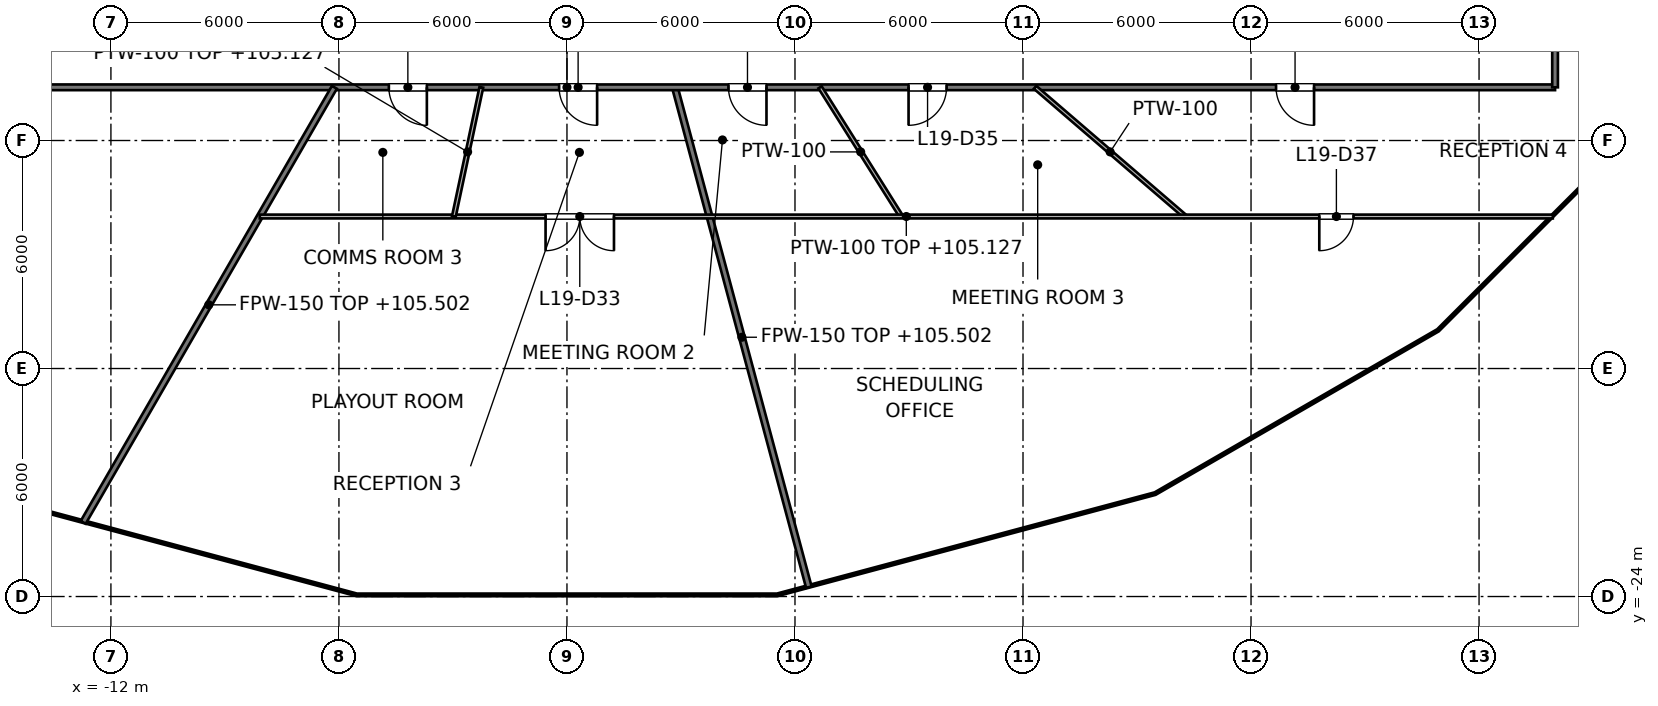
"""IFC4 building model, lengths in metres.
Left out: names, types, materials, properties, quantities, classifications, styles, units other than length and angle.
Written with IfcOpenShell. Run it as: python <this file> out.ifc"""

import sys

from ifc_helpers import new_model, si_unit, direction, frame, frame_2d, origin, place, context, subcontext, project, spatial, rectangle, extrude, element, fill, save


model = new_model("IFC4")
c1 = context("Model", 3, precision=1e-05, world=origin(), true_north=direction((0.0, 1.0)))
c2 = subcontext(c1, "Body", "Model", "MODEL_VIEW")
j1 = project(units=[si_unit("LENGTHUNIT", "METRE"), si_unit("PLANEANGLEUNIT", "RADIAN")], contexts=[c1])
p1 = place(None, origin())
s1 = spatial("IfcSite", under=j1, at=p1, CompositionType="ELEMENT")
p2 = place(p1, origin())
s2 = spatial("IfcBuilding", under=s1, at=p2, CompositionType="ELEMENT")
p3 = place(p2, frame((0.0, 0.0, 102.0)))
s3 = spatial("IfcBuildingStorey", under=s2, at=p3, CompositionType="ELEMENT", Elevation=102.0)
p4 = place(p3, frame((2.84, -10.6, 0.0), z_axis=(0.0, 0.0, 1.0), x_axis=(0.258826294763, -0.965923883719, 0.0)))
e1 = element("IfcWall", 1, at=p4, inside=s3, PredefinedType="PARTITIONING", context=c2, shape_type="SweptSolid", body=[
    extrude(rectangle(XDim=13.618, YDim=0.15, at=frame_2d((6.809, 0.0))), origin(), (0.0, 0.0, 1.0), 3.502),
])
p5 = place(p3, frame((-26.0, -10.6, 0.0), z_axis=(0.0, 0.0, 1.0), x_axis=(1.0, 0.0, 0.0)))
e2 = element("IfcWall", 2, at=p5, inside=s3, PredefinedType="PARTITIONING", context=c2, shape_type="SweptSolid", body=[
    extrude(rectangle(XDim=52.0, YDim=0.15, at=frame_2d((26.0, 0.0))), origin(), (0.0, 0.0, 1.0), 3.127),
])
p6 = place(p5, frame((9.34, 0.0, 0.0)))
e3 = element("IfcOpeningElement", 3, at=p6, cuts=e2, PredefinedType="OPENING", context=c2, shape_type="SweptSolid", body=[
    extrude(rectangle(XDim=1.2, YDim=2.1, at=frame_2d((0.6, 1.05))), frame((0.0, 0.075, 0.0), z_axis=(0.0, -1.0, 0.0), x_axis=(1.0, 0.0, 0.0)), (0.0, 0.0, 1.0), 0.15),
])
p7 = place(p5, frame((21.313, 0.0, 0.0)))
e4 = element("IfcOpeningElement", 4, at=p7, cuts=e2, PredefinedType="OPENING", context=c2, shape_type="SweptSolid", body=[
    extrude(rectangle(XDim=1.0, YDim=2.1, at=frame_2d((0.5, 1.05))), frame((0.0, 0.075, 0.0), z_axis=(0.0, -1.0, 0.0), x_axis=(1.0, 0.0, 0.0)), (0.0, 0.0, 1.0), 0.15),
])
p8 = place(p5, frame((25.793, 0.0, 0.0)))
e5 = element("IfcOpeningElement", 5, at=p8, cuts=e2, PredefinedType="OPENING", context=c2, shape_type="SweptSolid", body=[
    extrude(rectangle(XDim=1.0, YDim=2.1, at=frame_2d((0.5, 1.05))), frame((0.0, 0.075, 0.0), z_axis=(0.0, -1.0, 0.0), x_axis=(1.0, 0.0, 0.0)), (0.0, 0.0, 1.0), 0.15),
])
p9 = place(p5, frame((30.25, 0.0, 0.0)))
e6 = element("IfcOpeningElement", 6, at=p9, cuts=e2, PredefinedType="OPENING", context=c2, shape_type="SweptSolid", body=[
    extrude(rectangle(XDim=1.0, YDim=2.1, at=frame_2d((0.5, 1.05))), frame((0.0, 0.075, 0.0), z_axis=(0.0, -1.0, 0.0), x_axis=(1.0, 0.0, 0.0)), (0.0, 0.0, 1.0), 0.15),
])
p10 = place(p5, frame((34.989, 0.0, 0.0)))
e7 = element("IfcOpeningElement", 7, at=p10, cuts=e2, PredefinedType="OPENING", context=c2, shape_type="SweptSolid", body=[
    extrude(rectangle(XDim=1.0, YDim=2.1, at=frame_2d((0.5, 1.05))), frame((0.0, 0.075, 0.0), z_axis=(0.0, -1.0, 0.0), x_axis=(1.0, 0.0, 0.0)), (0.0, 0.0, 1.0), 0.15),
])
p11 = place(p5, frame((44.658, 0.0, 0.0)))
e8 = element("IfcOpeningElement", 8, at=p11, cuts=e2, PredefinedType="OPENING", context=c2, shape_type="SweptSolid", body=[
    extrude(rectangle(XDim=1.0, YDim=2.1, at=frame_2d((0.5, 1.05))), frame((0.0, 0.075, 0.0), z_axis=(0.0, -1.0, 0.0), x_axis=(1.0, 0.0, 0.0)), (0.0, 0.0, 1.0), 0.15),
])
p12 = place(p3, frame((-12.729, -22.048, 0.0), z_axis=(0.0, 0.0, 1.0), x_axis=(0.499978786084, 0.866037651298, 0.0)))
e9 = element("IfcWall", 9, at=p12, inside=s3, PredefinedType="PARTITIONING", context=c2, shape_type="SweptSolid", body=[
    extrude(rectangle(XDim=13.219, YDim=0.15, at=frame_2d((6.609, 0.0))), origin(), (0.0, 0.0, 1.0), 3.502),
])
p13 = place(p3, frame((26.0, -10.6, 0.0), z_axis=(0.0, 0.0, 1.0), x_axis=(0.0, 1.0, 0.0)))
e10 = element("IfcWall", 10, at=p13, inside=s3, PredefinedType="PARTITIONING", context=c2, shape_type="SweptSolid", body=[
    extrude(rectangle(XDim=2.8, YDim=0.15, at=frame_2d((1.4, 0.0))), origin(), (0.0, 0.0, 1.0), 3.276),
])
p14 = place(p3, frame((6.66, -10.6, 0.0), z_axis=(0.0, 0.0, 1.0), x_axis=(0.532193956065, -0.846622461979, 0.0)))
e11 = element("IfcWall", 11, at=p14, inside=s3, PredefinedType="PARTITIONING", context=c2, shape_type="SweptSolid", body=[
    extrude(rectangle(XDim=4.016, YDim=0.1, at=frame_2d((2.008, 0.0))), origin(), (0.0, 0.0, 1.0), 4.05),
])
p15 = place(p3, frame((12.317, -10.6, 0.0), z_axis=(0.0, 0.0, 1.0), x_axis=(0.758005488553, -0.652248173109, 0.0)))
e12 = element("IfcWall", 12, at=p15, inside=s3, PredefinedType="PARTITIONING", context=c2, shape_type="SweptSolid", body=[
    extrude(rectangle(XDim=5.213, YDim=0.1, at=frame_2d((2.606, 0.0))), origin(), (0.0, 0.0, 1.0), 4.05),
])
p16 = place(p3, frame((-8.083, -14.0, 0.0), z_axis=(0.0, 0.0, 1.0), x_axis=(1.0, 0.0, 0.0)))
e13 = element("IfcWall", 13, at=p16, inside=s3, PredefinedType="PARTITIONING", context=c2, shape_type="SweptSolid", body=[
    extrude(rectangle(XDim=34.024, YDim=0.1, at=frame_2d((17.012, 0.0))), origin(), (0.0, 0.0, 1.0), 3.127),
])
p17 = place(p16, frame((7.52, 0.0, 0.0)))
e14 = element("IfcOpeningElement", 14, at=p17, cuts=e13, PredefinedType="OPENING", context=c2, shape_type="SweptSolid", body=[
    extrude(rectangle(XDim=1.8, YDim=2.1, at=frame_2d((0.9, 1.05))), frame((0.0, 0.05, 0.0), z_axis=(0.0, -1.0, 0.0), x_axis=(1.0, 0.0, 0.0)), (0.0, 0.0, 1.0), 0.1),
])
p18 = place(p16, frame((27.879, 0.0, 0.0)))
e15 = element("IfcOpeningElement", 15, at=p18, cuts=e13, PredefinedType="OPENING", context=c2, shape_type="SweptSolid", body=[
    extrude(rectangle(XDim=0.9, YDim=2.1, at=frame_2d((0.45, 1.05))), frame((0.0, 0.05, 0.0), z_axis=(0.0, -1.0, 0.0), x_axis=(1.0, 0.0, 0.0)), (0.0, 0.0, 1.0), 0.1),
])
p19 = place(p3, frame((-2.976, -14.0, 0.0), z_axis=(0.0, 0.0, 1.0), x_axis=(0.208041878594, 0.978119919412, 0.0)))
e16 = element("IfcWall", 16, at=p19, inside=s3, PredefinedType="PARTITIONING", context=c2, shape_type="SweptSolid", body=[
    extrude(rectangle(XDim=3.476, YDim=0.1, at=frame_2d((1.738, 0.0))), origin(), (0.0, 0.0, 1.0), 3.127),
])
p20 = place(p7, origin())
e17 = element("IfcDoor", 17, at=p20, inside=s3, OperationType="SINGLE_SWING_RIGHT", PredefinedType="DOOR", context=c2, shape_type="SweptSolid", body=[
    extrude(rectangle(XDim=1.0, YDim=2.1, at=frame_2d((0.5, 1.05))), frame((0.0, 0.025, 0.0), z_axis=(0.0, -1.0, 0.0), x_axis=(1.0, 0.0, 0.0)), (0.0, 0.0, 1.0), 0.05),
])
fill(e4, e17)
p21 = place(p8, origin())
e18 = element("IfcDoor", 18, at=p21, inside=s3, OperationType="SINGLE_SWING_RIGHT", PredefinedType="DOOR", context=c2, shape_type="SweptSolid", body=[
    extrude(rectangle(XDim=1.0, YDim=2.1, at=frame_2d((0.5, 1.05))), frame((0.0, 0.025, 0.0), z_axis=(0.0, -1.0, 0.0), x_axis=(1.0, 0.0, 0.0)), (0.0, 0.0, 1.0), 0.05),
])
fill(e5, e18)
p22 = place(p17, origin())
e19 = element("IfcDoor", 19, at=p22, inside=s3, OperationType="DOUBLE_DOOR_SINGLE_SWING", PredefinedType="DOOR", context=c2, shape_type="SweptSolid", body=[
    extrude(rectangle(XDim=1.8, YDim=2.1, at=frame_2d((0.9, 1.05))), frame((0.0, 0.025, 0.0), z_axis=(0.0, -1.0, 0.0), x_axis=(1.0, 0.0, 0.0)), (0.0, 0.0, 1.0), 0.05),
])
fill(e14, e19)
p23 = place(p9, origin())
e20 = element("IfcDoor", 20, at=p23, inside=s3, OperationType="SINGLE_SWING_RIGHT", PredefinedType="DOOR", context=c2, shape_type="SweptSolid", body=[
    extrude(rectangle(XDim=1.0, YDim=2.1, at=frame_2d((0.5, 1.05))), frame((0.0, 0.025, 0.0), z_axis=(0.0, -1.0, 0.0), x_axis=(1.0, 0.0, 0.0)), (0.0, 0.0, 1.0), 0.05),
])
fill(e6, e20)
p24 = place(p10, origin())
e21 = element("IfcDoor", 21, at=p24, inside=s3, OperationType="SINGLE_SWING_LEFT", PredefinedType="DOOR", context=c2, shape_type="SweptSolid", body=[
    extrude(rectangle(XDim=1.0, YDim=2.1, at=frame_2d((0.5, 1.05))), frame((0.0, 0.025, 0.0), z_axis=(0.0, -1.0, 0.0), x_axis=(1.0, 0.0, 0.0)), (0.0, 0.0, 1.0), 0.05),
])
fill(e7, e21)
p25 = place(p11, origin())
e22 = element("IfcDoor", 22, at=p25, inside=s3, OperationType="SINGLE_SWING_RIGHT", PredefinedType="DOOR", context=c2, shape_type="SweptSolid", body=[
    extrude(rectangle(XDim=1.0, YDim=2.1, at=frame_2d((0.5, 1.05))), frame((0.0, 0.025, 0.0), z_axis=(0.0, -1.0, 0.0), x_axis=(1.0, 0.0, 0.0)), (0.0, 0.0, 1.0), 0.05),
])
fill(e8, e22)
p26 = place(p18, origin())
e23 = element("IfcDoor", 23, at=p26, inside=s3, OperationType="SINGLE_SWING_LEFT", PredefinedType="DOOR", context=c2, shape_type="SweptSolid", body=[
    extrude(rectangle(XDim=0.9, YDim=2.1, at=frame_2d((0.45, 1.05))), frame((0.0, 0.025, 0.0), z_axis=(0.0, -1.0, 0.0), x_axis=(1.0, 0.0, 0.0)), (0.0, 0.0, 1.0), 0.05),
])
fill(e15, e23)
save(model, sys.argv[1])
